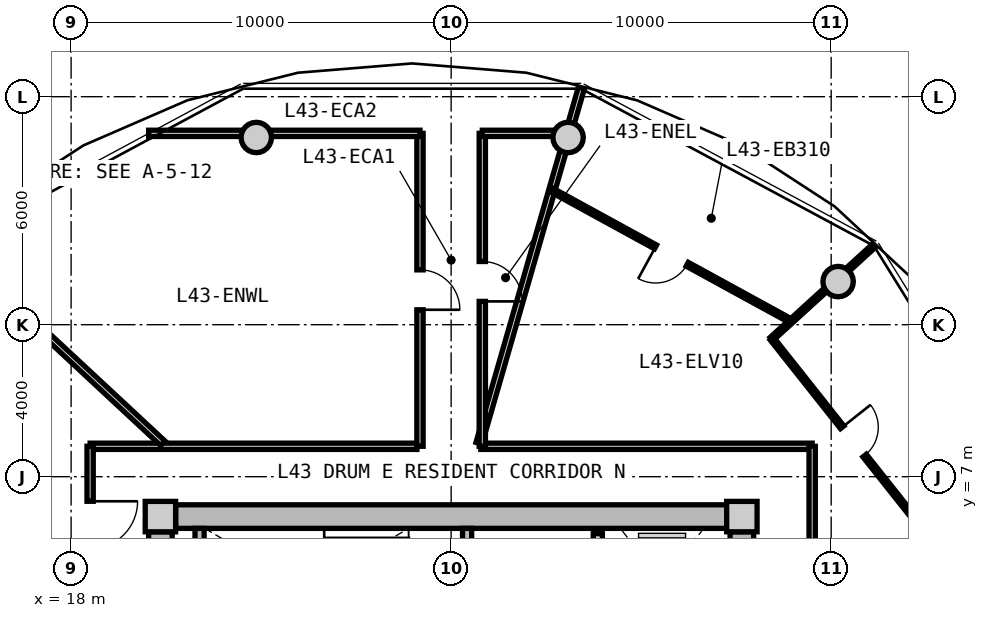
"""IFC4 building model, lengths in metres.
Left out: names, types, materials, properties, quantities, classifications, styles, units other than length and angle.
Written with IfcOpenShell. Run it as: python <this file> out.ifc"""

import sys

from ifc_helpers import new_model, si_unit, direction, frame, frame_2d, origin, origin_2d, place, context, subcontext, project, spatial, rectangle, circle, extrude, source, transform, mapped, element, fill, save


model = new_model("IFC4")
c1 = context("Model", 3, precision=1e-05, world=origin(), true_north=direction((0.0, 1.0)))
c2 = subcontext(c1, "Body", "Model", "MODEL_VIEW")
j1 = project(units=[si_unit("LENGTHUNIT", "METRE"), si_unit("PLANEANGLEUNIT", "RADIAN")], contexts=[c1])
p1 = place(None, origin())
s1 = spatial("IfcSite", under=j1, at=p1, CompositionType="ELEMENT")
p2 = place(p1, origin())
s2 = spatial("IfcBuilding", under=s1, at=p2, CompositionType="ELEMENT")
p3 = place(p2, frame((0.0, 0.0, 140.4)))
s3 = spatial("IfcBuildingStorey", under=s2, at=p3, CompositionType="ELEMENT", Elevation=140.4)
m1 = source(origin(), c2, "Body", "SweptSolid", [
    extrude(rectangle(XDim=0.8, YDim=0.8, at=origin_2d()), origin(), (0.0, 0.0, 1.0), 3.05),
])
for number, where, z_axis, x_axis in (
    (1, (35.65, 5.95, 0.0), (0.0, 0.0, 1.0), (1.0, 0.0, 0.0)),
    (2, (20.35, 5.95, 0.0), (0.0, 0.0, 1.0), (1.0, 0.0, 0.0)),
):
    element("IfcColumn", number, at=place(p3, frame(where, z_axis=z_axis, x_axis=x_axis)), inside=s3, PredefinedType="COLUMN", context=c2, shape_type="MappedRepresentation", body=[
        mapped(m1, transform((0.0, 0.0, 0.0), x_axis=(1.0, 0.0, 0.0), y_axis=(0.0, 1.0, 0.0), z_axis=(0.0, 0.0, 1.0), scale=1.0)),
    ])
m2 = source(origin(), c2, "Body", "SweptSolid", [
    extrude(rectangle(XDim=14.5, YDim=0.62, at=frame_2d((7.25, 0.0))), origin(), (0.0, 0.0, 1.0), 2.81),
])
p4 = place(p3, frame((20.75, 5.95, 0.0), z_axis=(0.0, 0.0, 1.0), x_axis=(1.0, 0.0, 0.0)))
e3 = element("IfcWall", 3, at=p4, inside=s3, PredefinedType="SHEAR", context=c2, shape_type="MappedRepresentation", body=[
    mapped(m2, transform((0.0, 0.0, 0.0), x_axis=(1.0, 0.0, 0.0), y_axis=(0.0, 1.0, 0.0), z_axis=(0.0, 0.0, 1.0), scale=1.0)),
])
m3 = source(origin(), c2, "Body", "SweptSolid", [
    extrude(rectangle(XDim=11.1, YDim=0.62, at=frame_2d((5.55, 0.0))), origin(), (0.0, 0.0, 1.0), 2.81),
])
p5 = place(p3, frame((20.35, -5.55, 0.0), z_axis=(0.0, 0.0, 1.0), x_axis=(0.0, 1.0, 0.0)))
e4 = element("IfcWall", 4, at=p5, inside=s3, PredefinedType="SHEAR", context=c2, shape_type="MappedRepresentation", body=[
    mapped(m3, transform((0.0, 0.0, 0.0), x_axis=(1.0, 0.0, 0.0), y_axis=(0.0, 1.0, 0.0), z_axis=(0.0, 0.0, 1.0), scale=1.0)),
])
p6 = place(p5, frame((3.8, 0.0, 0.0)))
e5 = element("IfcOpeningElement", 5, at=p6, cuts=e4, PredefinedType="OPENING", context=c2, shape_type="SweptSolid", body=[
    extrude(rectangle(XDim=1.2, YDim=2.15, at=frame_2d((0.6, 1.075))), frame((0.0, 0.32, 0.0), z_axis=(0.0, -1.0, 0.0), x_axis=(1.0, 0.0, 0.0)), (0.0, 0.0, 1.0), 0.64),
])
p7 = place(p3, frame((35.65, 5.55, 0.0), z_axis=(0.0, 0.0, 1.0), x_axis=(0.0, -1.0, 0.0)))
e6 = element("IfcWall", 6, at=p7, inside=s3, PredefinedType="SHEAR", context=c2, shape_type="MappedRepresentation", body=[
    mapped(m3, transform((0.0, 0.0, 0.0), x_axis=(1.0, 0.0, 0.0), y_axis=(0.0, 1.0, 0.0), z_axis=(0.0, 0.0, 1.0), scale=1.0)),
])
p8 = place(p7, frame((5.65, 0.0, 0.0)))
e7 = element("IfcOpeningElement", 7, at=p8, cuts=e6, PredefinedType="OPENING", context=c2, shape_type="SweptSolid", body=[
    extrude(rectangle(XDim=1.2, YDim=2.15, at=frame_2d((0.6, 1.075))), frame((0.0, 0.32, 0.0), z_axis=(0.0, -1.0, 0.0), x_axis=(1.0, 0.0, 0.0)), (0.0, 0.0, 1.0), 0.64),
])
m4 = source(origin(), c2, "Body", "SweptSolid", [
    extrude(circle(Radius=0.4, at=origin_2d()), origin(), (0.0, 0.0, 1.0), 3.05),
])
for number, where, z_axis, x_axis in (
    (8, (38.183, 12.135, 0.0), (0.0, 0.0, 1.0), (1.0, 0.0, 0.0)),
    (9, (31.077, 15.926, 0.0), (0.0, 0.0, 1.0), (1.0, 0.0, 0.0)),
    (10, (22.873, 15.926, 0.0), (0.0, 0.0, 1.0), (1.0, 0.0, 0.0)),
):
    element("IfcColumn", number, at=place(p3, frame(where, z_axis=z_axis, x_axis=x_axis)), inside=s3, PredefinedType="COLUMN", context=c2, shape_type="MappedRepresentation", body=[
        mapped(m4, transform((0.0, 0.0, 0.0), x_axis=(1.0, 0.0, 0.0), y_axis=(0.0, 1.0, 0.0), z_axis=(0.0, 0.0, 1.0), scale=1.0)),
    ])
m5 = source(origin(), c2, "Body", "SweptSolid", [
    extrude(rectangle(XDim=3.19, YDim=0.24, at=frame_2d((1.595, 0.0))), origin(), (0.0, 0.0, 1.0), 2.81),
])
p9 = place(p3, frame((21.38, 2.45, 0.0), z_axis=(0.0, 0.0, 1.0), x_axis=(0.0, 1.0, 0.0)))
e11 = element("IfcWall", 11, at=p9, inside=s3, PredefinedType="PARTITIONING", context=c2, shape_type="MappedRepresentation", body=[
    mapped(m5, transform((0.0, 0.0, 0.0), x_axis=(1.0, 0.0, 0.0), y_axis=(0.0, 1.0, 0.0), z_axis=(0.0, 0.0, 1.0), scale=1.0)),
])
p10 = place(p3, frame((28.42, 2.45, 0.0), z_axis=(0.0, 0.0, 1.0), x_axis=(0.0, 1.0, 0.0)))
e12 = element("IfcWall", 12, at=p10, inside=s3, PredefinedType="PARTITIONING", context=c2, shape_type="MappedRepresentation", body=[
    mapped(m5, transform((0.0, 0.0, 0.0), x_axis=(1.0, 0.0, 0.0), y_axis=(0.0, 1.0, 0.0), z_axis=(0.0, 0.0, 1.0), scale=1.0)),
])
p11 = place(p10, frame((0.55, 0.0, 0.0)))
e13 = element("IfcOpeningElement", 13, at=p11, cuts=e12, PredefinedType="OPENING", context=c2, shape_type="SweptSolid", body=[
    extrude(rectangle(XDim=1.1, YDim=2.15, at=frame_2d((0.55, 1.075))), frame((0.0, 0.13, 0.0), z_axis=(0.0, -1.0, 0.0), x_axis=(1.0, 0.0, 0.0)), (0.0, 0.0, 1.0), 0.26),
])
m6 = source(origin(), c2, "Body", "SweptSolid", [
    extrude(rectangle(XDim=5.0, YDim=0.24, at=frame_2d((2.5, 0.0))), origin(), (0.0, 0.0, 1.0), 2.795),
])
p12 = place(p3, frame((31.86, 0.5, 0.0), z_axis=(0.0, 0.0, 1.0), x_axis=(0.0, 1.0, 0.0)))
e14 = element("IfcWall", 14, at=p12, inside=s3, PredefinedType="PARTITIONING", context=c2, shape_type="MappedRepresentation", body=[
    mapped(m6, transform((0.0, 0.0, 0.0), x_axis=(1.0, 0.0, 0.0), y_axis=(0.0, 1.0, 0.0), z_axis=(0.0, 0.0, 1.0), scale=1.0)),
])
p13 = place(p12, frame((3.05, 0.0, 0.0)))
e15 = element("IfcOpeningElement", 15, at=p13, cuts=e14, PredefinedType="OPENING", context=c2, shape_type="SweptSolid", body=[
    extrude(rectangle(XDim=1.3, YDim=2.2, at=frame_2d((0.65, 1.1))), frame((0.0, 0.13, 0.0), z_axis=(0.0, -1.0, 0.0), x_axis=(1.0, 0.0, 0.0)), (0.0, 0.0, 1.0), 0.26),
])
p14 = place(p12, frame((0.55, 0.0, 0.0)))
e16 = element("IfcOpeningElement", 16, at=p14, cuts=e14, PredefinedType="OPENING", context=c2, shape_type="SweptSolid", body=[
    extrude(rectangle(XDim=1.3, YDim=2.2, at=frame_2d((0.65, 1.1))), frame((0.0, 0.13, 0.0), z_axis=(0.0, -1.0, 0.0), x_axis=(1.0, 0.0, 0.0)), (0.0, 0.0, 1.0), 0.26),
])
m7 = source(origin(), c2, "Body", "SweptSolid", [
    extrude(rectangle(XDim=8.6, YDim=0.165, at=frame_2d((4.3, 0.0))), origin(), (0.0, 0.0, 1.0), 2.795),
])
p15 = place(p3, frame((18.5, 7.8, 0.0), z_axis=(0.0, 0.0, 1.0), x_axis=(1.0, 0.0, 0.0)))
e17 = element("IfcWall", 17, at=p15, inside=s3, PredefinedType="PARTITIONING", context=c2, shape_type="MappedRepresentation", body=[
    mapped(m7, transform((0.0, 0.0, 0.0), x_axis=(1.0, 0.0, 0.0), y_axis=(0.0, 1.0, 0.0), z_axis=(0.0, 0.0, 1.0), scale=1.0)),
])
m8 = source(origin(), c2, "Body", "SweptSolid", [
    extrude(rectangle(XDim=8.719, YDim=0.165, at=frame_2d((4.36, 0.0))), origin(), (0.0, 0.0, 1.0), 2.795),
])
p16 = place(p3, frame((28.781, 7.8, 0.0), z_axis=(0.0, 0.0, 1.0), x_axis=(1.0, 0.0, 0.0)))
e18 = element("IfcWall", 18, at=p16, inside=s3, PredefinedType="PARTITIONING", context=c2, shape_type="MappedRepresentation", body=[
    mapped(m8, transform((0.0, 0.0, 0.0), x_axis=(1.0, 0.0, 0.0), y_axis=(0.0, 1.0, 0.0), z_axis=(0.0, 0.0, 1.0), scale=1.0)),
])
m9 = source(origin(), c2, "Body", "SweptSolid", [
    extrude(rectangle(XDim=15.6, YDim=0.165, at=frame_2d((7.8, 0.0))), origin(), (0.0, 0.0, 1.0), 2.795),
])
p17 = place(p3, frame((18.5, -7.8, 0.0), z_axis=(0.0, 0.0, 1.0), x_axis=(0.0, 1.0, 0.0)))
e19 = element("IfcWall", 19, at=p17, inside=s3, PredefinedType="PARTITIONING", context=c2, shape_type="MappedRepresentation", body=[
    mapped(m9, transform((0.0, 0.0, 0.0), x_axis=(1.0, 0.0, 0.0), y_axis=(0.0, 1.0, 0.0), z_axis=(0.0, 0.0, 1.0), scale=1.0)),
])
p18 = place(p17, frame((12.903, 0.0, 0.0)))
e20 = element("IfcOpeningElement", 20, at=p18, cuts=e19, PredefinedType="OPENING", context=c2, shape_type="SweptSolid", body=[
    extrude(rectangle(XDim=1.25, YDim=2.2, at=frame_2d((0.625, 1.1))), frame((0.0, 0.093, 0.0), z_axis=(0.0, -1.0, 0.0), x_axis=(1.0, 0.0, 0.0)), (0.0, 0.0, 1.0), 0.185),
])
p19 = place(p17, frame((8.95, 0.0, 0.0)))
e21 = element("IfcOpeningElement", 21, at=p19, cuts=e19, PredefinedType="OPENING", context=c2, shape_type="SweptSolid", body=[
    extrude(rectangle(XDim=1.25, YDim=2.2, at=frame_2d((0.625, 1.1))), frame((0.0, 0.093, 0.0), z_axis=(0.0, -1.0, 0.0), x_axis=(1.0, 0.0, 0.0)), (0.0, 0.0, 1.0), 0.185),
])
p20 = place(p3, frame((37.5, 7.8, 0.0), z_axis=(0.0, 0.0, 1.0), x_axis=(0.0, -1.0, 0.0)))
e22 = element("IfcWall", 22, at=p20, inside=s3, PredefinedType="PARTITIONING", context=c2, shape_type="MappedRepresentation", body=[
    mapped(m9, transform((0.0, 0.0, 0.0), x_axis=(1.0, 0.0, 0.0), y_axis=(0.0, 1.0, 0.0), z_axis=(0.0, 0.0, 1.0), scale=1.0)),
])
p21 = place(p20, frame((5.687, 0.0, 0.0)))
e23 = element("IfcOpeningElement", 23, at=p21, cuts=e22, PredefinedType="OPENING", context=c2, shape_type="SweptSolid", body=[
    extrude(rectangle(XDim=1.05, YDim=2.15, at=frame_2d((0.525, 1.075))), frame((0.0, 0.093, 0.0), z_axis=(0.0, -1.0, 0.0), x_axis=(1.0, 0.0, 0.0)), (0.0, 0.0, 1.0), 0.185),
])
m10 = source(origin(), c2, "Body", "SweptSolid", [
    extrude(rectangle(XDim=9.73, YDim=0.165, at=frame_2d((4.865, 0.0))), origin(), (0.0, 0.0, 1.0), 2.345),
])
p22 = place(p3, frame((28.733, 7.88, 0.0), z_axis=(0.0, 0.0, 1.0), x_axis=(0.27679492614, 0.960929013436, 0.0)))
e24 = element("IfcWall", 24, at=p22, inside=s3, PredefinedType="PARTITIONING", context=c2, shape_type="MappedRepresentation", body=[
    mapped(m10, transform((0.0, 0.0, 0.0), x_axis=(1.0, 0.0, 0.0), y_axis=(0.0, 1.0, 0.0), z_axis=(0.0, 0.0, 1.0), scale=1.0)),
])
m11 = source(origin(), c2, "Body", "SweptSolid", [
    extrude(rectangle(XDim=7.648, YDim=0.165, at=frame_2d((3.824, 0.0))), origin(), (0.0, 0.0, 1.0), 2.345),
])
p23 = place(p3, frame((20.413, 7.88, 0.0), z_axis=(0.0, 0.0, 1.0), x_axis=(-0.732182665826, 0.681108320213, 0.0)))
e25 = element("IfcWall", 25, at=p23, inside=s3, PredefinedType="PARTITIONING", context=c2, shape_type="MappedRepresentation", body=[
    mapped(m11, transform((0.0, 0.0, 0.0), x_axis=(1.0, 0.0, 0.0), y_axis=(0.0, 1.0, 0.0), z_axis=(0.0, 0.0, 1.0), scale=1.0)),
])
m12 = source(origin(), c2, "Body", "SweptSolid", [
    extrude(rectangle(XDim=8.235, YDim=0.165, at=frame_2d((4.118, 0.0))), origin(), (0.0, 0.0, 1.0), 2.795),
])
p24 = place(p3, frame((27.18, 7.8, 0.0), z_axis=(0.0, 0.0, 1.0), x_axis=(0.0, 1.0, 0.0)))
e26 = element("IfcWall", 26, at=p24, inside=s3, PredefinedType="PARTITIONING", context=c2, shape_type="MappedRepresentation", body=[
    mapped(m12, transform((0.0, 0.0, 0.0), x_axis=(1.0, 0.0, 0.0), y_axis=(0.0, 1.0, 0.0), z_axis=(0.0, 0.0, 1.0), scale=1.0)),
])
p25 = place(p24, frame((3.593, 0.0, 0.0)))
e27 = element("IfcOpeningElement", 27, at=p25, cuts=e26, PredefinedType="OPENING", context=c2, shape_type="SweptSolid", body=[
    extrude(rectangle(XDim=1.05, YDim=2.15, at=frame_2d((0.525, 1.075))), frame((0.0, 0.093, 0.0), z_axis=(0.0, -1.0, 0.0), x_axis=(1.0, 0.0, 0.0)), (0.0, 0.0, 1.0), 0.185),
])
m13 = source(origin(), c2, "Body", "SweptSolid", [
    extrude(rectangle(XDim=7.139, YDim=0.165, at=frame_2d((3.569, 0.0))), origin(), (0.0, 0.0, 1.0), 2.345),
])
p26 = place(p3, frame((20.041, 16.035, 0.0), z_axis=(0.0, 0.0, 1.0), x_axis=(1.0, 0.0, 0.0)))
e28 = element("IfcWall", 28, at=p26, inside=s3, PredefinedType="PARTITIONING", context=c2, shape_type="MappedRepresentation", body=[
    mapped(m13, transform((0.0, 0.0, 0.0), x_axis=(1.0, 0.0, 0.0), y_axis=(0.0, 1.0, 0.0), z_axis=(0.0, 0.0, 1.0), scale=1.0)),
])
p27 = place(p3, frame((28.82, 7.8, 0.0), z_axis=(0.0, 0.0, 1.0), x_axis=(0.0, 1.0, 0.0)))
e29 = element("IfcWall", 29, at=p27, inside=s3, PredefinedType="PARTITIONING", context=c2, shape_type="MappedRepresentation", body=[
    mapped(m12, transform((0.0, 0.0, 0.0), x_axis=(1.0, 0.0, 0.0), y_axis=(0.0, 1.0, 0.0), z_axis=(0.0, 0.0, 1.0), scale=1.0)),
])
p28 = place(p27, frame((3.813, 0.0, 0.0)))
e30 = element("IfcOpeningElement", 30, at=p28, cuts=e29, PredefinedType="OPENING", context=c2, shape_type="SweptSolid", body=[
    extrude(rectangle(XDim=1.05, YDim=2.15, at=frame_2d((0.525, 1.075))), frame((0.0, 0.093, 0.0), z_axis=(0.0, -1.0, 0.0), x_axis=(1.0, 0.0, 0.0)), (0.0, 0.0, 1.0), 0.185),
])
m14 = source(origin(), c2, "Body", "SweptSolid", [
    extrude(rectangle(XDim=2.419, YDim=0.165, at=frame_2d((1.209, 0.0))), origin(), (0.0, 0.0, 1.0), 2.345),
])
p29 = place(p3, frame((28.82, 16.035, 0.0), z_axis=(0.0, 0.0, 1.0), x_axis=(1.0, 0.0, 0.0)))
e31 = element("IfcWall", 31, at=p29, inside=s3, PredefinedType="PARTITIONING", context=c2, shape_type="MappedRepresentation", body=[
    mapped(m14, transform((0.0, 0.0, 0.0), x_axis=(1.0, 0.0, 0.0), y_axis=(0.0, 1.0, 0.0), z_axis=(0.0, 0.0, 1.0), scale=1.0)),
])
m15 = source(origin(), c2, "Body", "SweptSolid", [
    extrude(rectangle(XDim=8.305, YDim=0.19, at=frame_2d((4.153, 0.0))), origin(), (0.0, 0.0, 1.0), 2.345),
])
p30 = place(p3, frame((18.42, 3.908, 0.0), z_axis=(0.0, 0.0, 1.0), x_axis=(-0.970309994378, 0.241864662175, 0.0)))
e32 = element("IfcWall", 32, at=p30, inside=s3, PredefinedType="PARTITIONING", context=c2, shape_type="MappedRepresentation", body=[
    mapped(m15, transform((0.0, 0.0, 0.0), x_axis=(1.0, 0.0, 0.0), y_axis=(0.0, 1.0, 0.0), z_axis=(0.0, 0.0, 1.0), scale=1.0)),
])
m16 = source(origin(), c2, "Body", "SweptSolid", [
    extrude(rectangle(XDim=6.902, YDim=0.115, at=frame_2d((3.451, 0.0))), origin(), (0.0, 0.0, 1.0), 2.795),
])
p31 = place(p3, frame((40.729, 5.223, 0.0), z_axis=(0.0, 0.0, 1.0), x_axis=(-0.62123371778, 0.783625336429, 0.0)))
e33 = element("IfcWall", 33, at=p31, inside=s3, PredefinedType="PARTITIONING", context=c2, shape_type="MappedRepresentation", body=[
    mapped(m16, transform((0.0, 0.0, 0.0), x_axis=(1.0, 0.0, 0.0), y_axis=(0.0, 1.0, 0.0), z_axis=(0.0, 0.0, 1.0), scale=1.0)),
])
p32 = place(p31, frame((2.976, 0.0, 0.0)))
e34 = element("IfcOpeningElement", 34, at=p32, cuts=e33, PredefinedType="OPENING", context=c2, shape_type="SweptSolid", body=[
    extrude(rectangle(XDim=0.95, YDim=2.1, at=frame_2d((0.475, 1.05))), frame((0.0, 0.067, 0.0), z_axis=(0.0, -1.0, 0.0), x_axis=(1.0, 0.0, 0.0)), (0.0, 0.0, 1.0), 0.135),
])
m17 = source(origin(), c2, "Body", "SweptSolid", [
    extrude(rectangle(XDim=7.167, YDim=0.115, at=frame_2d((3.583, 0.0))), origin(), (0.0, 0.0, 1.0), 2.795),
])
p33 = place(p3, frame((36.939, 11.098, 0.0), z_axis=(0.0, 0.0, 1.0), x_axis=(-0.8771628907, 0.480192943699, 0.0)))
e35 = element("IfcWall", 35, at=p33, inside=s3, PredefinedType="PARTITIONING", context=c2, shape_type="MappedRepresentation", body=[
    mapped(m17, transform((0.0, 0.0, 0.0), x_axis=(1.0, 0.0, 0.0), y_axis=(0.0, 1.0, 0.0), z_axis=(0.0, 0.0, 1.0), scale=1.0)),
])
p34 = place(p33, frame((3.108, 0.0, 0.0)))
e36 = element("IfcOpeningElement", 36, at=p34, cuts=e35, PredefinedType="OPENING", context=c2, shape_type="SweptSolid", body=[
    extrude(rectangle(XDim=0.95, YDim=2.1, at=frame_2d((0.475, 1.05))), frame((0.0, 0.067, 0.0), z_axis=(0.0, -1.0, 0.0), x_axis=(1.0, 0.0, 0.0)), (0.0, 0.0, 1.0), 0.135),
])
m18 = source(origin(), c2, "Body", "SweptSolid", [
    extrude(rectangle(XDim=3.66, YDim=0.115, at=frame_2d((1.83, 0.0))), origin(), (0.0, 0.0, 1.0), 2.345),
])
p35 = place(p3, frame((36.432, 10.624, 0.0), z_axis=(0.0, 0.0, 1.0), x_axis=(0.73909744987, 0.673598515137, 0.0)))
e37 = element("IfcWall", 37, at=p35, inside=s3, PredefinedType="PARTITIONING", context=c2, shape_type="MappedRepresentation", body=[
    mapped(m18, transform((0.0, 0.0, 0.0), x_axis=(1.0, 0.0, 0.0), y_axis=(0.0, 1.0, 0.0), z_axis=(0.0, 0.0, 1.0), scale=1.0)),
])
m19 = source(origin(), c2, "Body", "SweptSolid", [
    extrude(rectangle(XDim=1.05, YDim=2.15, at=frame_2d((0.525, 1.075))), frame((0.0, 0.025, 0.0), z_axis=(0.0, -1.0, 0.0), x_axis=(1.0, 0.0, 0.0)), (0.0, 0.0, 1.0), 0.05),
])
p36 = place(p25, frame((1.05, 0.0, 0.0), z_axis=(0.0, 0.0, 1.0), x_axis=(-1.0, 0.0, 0.0)))
e38 = element("IfcDoor", 38, at=p36, inside=s3, OperationType="SINGLE_SWING_RIGHT", PredefinedType="DOOR", context=c2, shape_type="MappedRepresentation", body=[
    mapped(m19, transform((0.0, 0.0, 0.0), x_axis=(1.0, 0.0, 0.0), y_axis=(0.0, 1.0, 0.0), z_axis=(0.0, 0.0, 1.0), scale=1.0)),
])
fill(e27, e38)
p37 = place(p28, frame((1.05, 0.0, 0.0), z_axis=(0.0, 0.0, 1.0), x_axis=(-1.0, 0.0, 0.0)))
e39 = element("IfcDoor", 39, at=p37, inside=s3, OperationType="SINGLE_SWING_RIGHT", PredefinedType="DOOR", context=c2, shape_type="MappedRepresentation", body=[
    mapped(m19, transform((0.0, 0.0, 0.0), x_axis=(1.0, 0.0, 0.0), y_axis=(0.0, 1.0, 0.0), z_axis=(0.0, 0.0, 1.0), scale=1.0)),
])
fill(e30, e39)
m20 = source(origin(), c2, "Body", "SweptSolid", [
    extrude(rectangle(XDim=1.25, YDim=2.2, at=frame_2d((0.625, 1.1))), frame((0.0, 0.025, 0.0), z_axis=(0.0, -1.0, 0.0), x_axis=(1.0, 0.0, 0.0)), (0.0, 0.0, 1.0), 0.05),
])
p38 = place(p18, frame((1.25, 0.0, 0.0), z_axis=(0.0, 0.0, 1.0), x_axis=(-1.0, 0.0, 0.0)))
e40 = element("IfcDoor", 40, at=p38, inside=s3, OperationType="SINGLE_SWING_LEFT", PredefinedType="DOOR", context=c2, shape_type="MappedRepresentation", body=[
    mapped(m20, transform((0.0, 0.0, 0.0), x_axis=(1.0, 0.0, 0.0), y_axis=(0.0, 1.0, 0.0), z_axis=(0.0, 0.0, 1.0), scale=1.0)),
])
fill(e20, e40)
m21 = source(origin(), c2, "Body", "SweptSolid", [
    extrude(rectangle(XDim=0.95, YDim=2.1, at=frame_2d((0.475, 1.05))), frame((0.0, 0.025, 0.0), z_axis=(0.0, -1.0, 0.0), x_axis=(1.0, 0.0, 0.0)), (0.0, 0.0, 1.0), 0.05),
])
p39 = place(p32, frame((0.95, 0.0, 0.0), z_axis=(0.0, 0.0, 1.0), x_axis=(-1.0, 0.0, 0.0)))
e41 = element("IfcDoor", 41, at=p39, inside=s3, OperationType="SINGLE_SWING_LEFT", PredefinedType="DOOR", context=c2, shape_type="MappedRepresentation", body=[
    mapped(m21, transform((0.0, 0.0, 0.0), x_axis=(1.0, 0.0, 0.0), y_axis=(0.0, 1.0, 0.0), z_axis=(0.0, 0.0, 1.0), scale=1.0)),
])
fill(e34, e41)
p40 = place(p34, origin())
e42 = element("IfcDoor", 42, at=p40, inside=s3, OperationType="SINGLE_SWING_RIGHT", PredefinedType="DOOR", context=c2, shape_type="MappedRepresentation", body=[
    mapped(m21, transform((0.0, 0.0, 0.0), x_axis=(1.0, 0.0, 0.0), y_axis=(0.0, 1.0, 0.0), z_axis=(0.0, 0.0, 1.0), scale=1.0)),
])
fill(e36, e42)
save(model, sys.argv[1])
